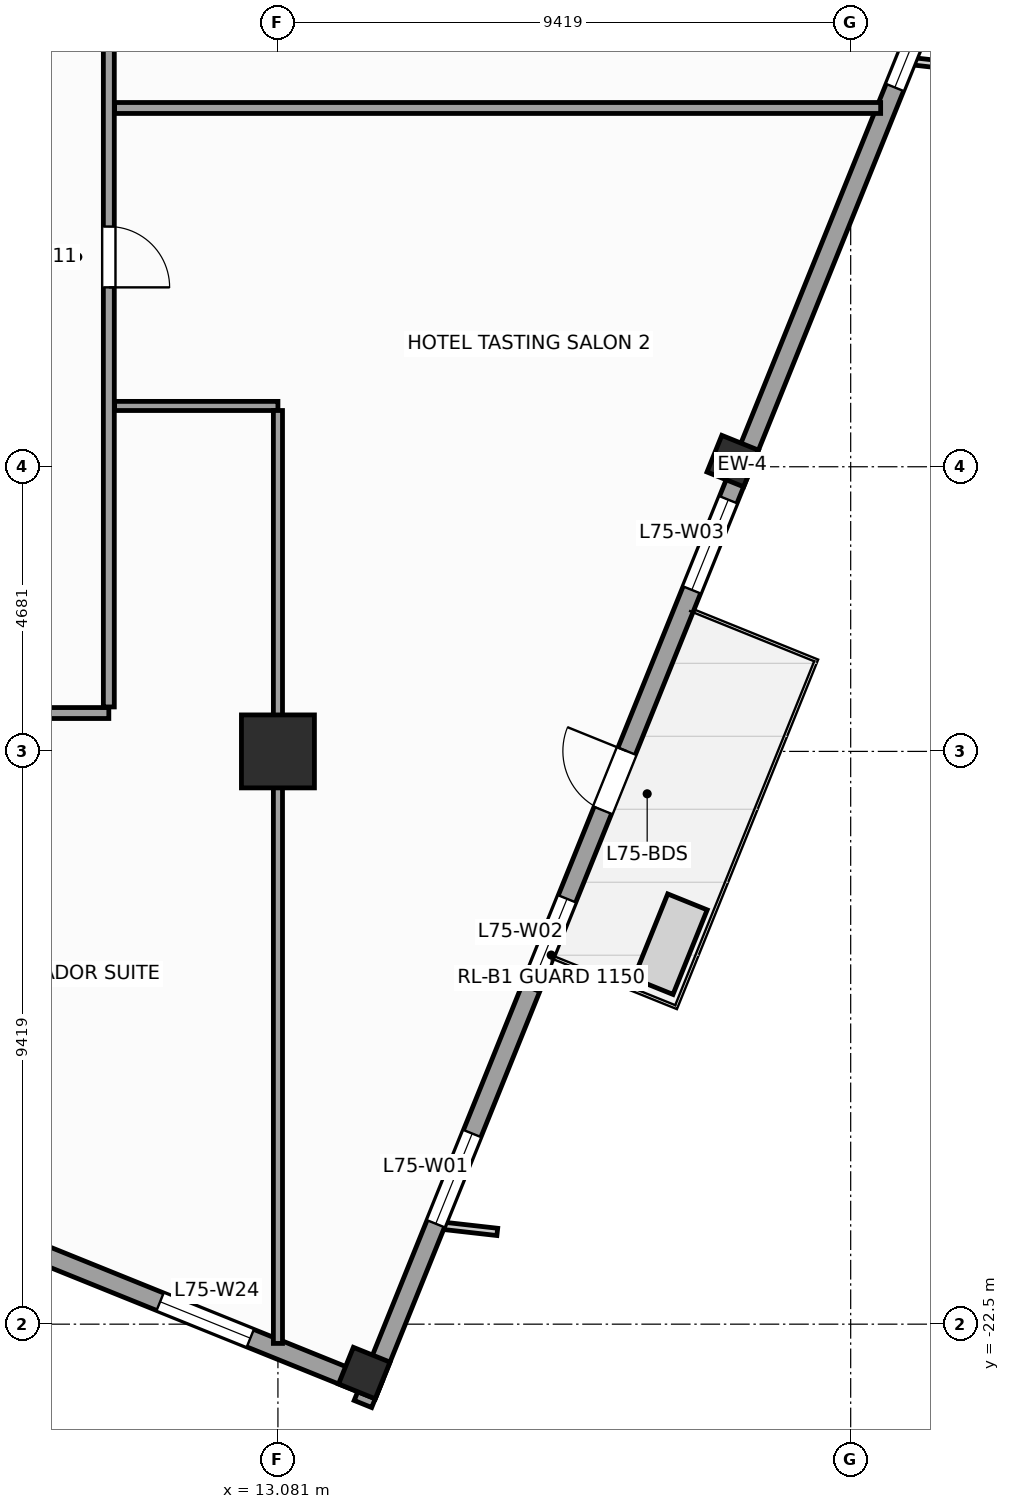
"""IFC4 building model, lengths in metres.
Left out: names, types, materials, properties, quantities, classifications, styles, units other than length and angle.
Written with IfcOpenShell. Run it as: python <this file> out.ifc"""

import sys

from ifc_helpers import new_model, si_unit, direction, frame, frame_2d, origin, origin_2d, place, context, subcontext, project, spatial, rectangle, extrude, source, transform, mapped, element, fill, save


model = new_model("IFC4")
c1 = context("Model", 3, precision=1e-05, world=origin(), true_north=direction((0.0, 1.0)))
c2 = subcontext(c1, "Body", "Model", "MODEL_VIEW")
j1 = project(units=[si_unit("LENGTHUNIT", "METRE"), si_unit("PLANEANGLEUNIT", "RADIAN")], contexts=[c1])
p1 = place(None, origin())
s1 = spatial("IfcSite", under=j1, at=p1, CompositionType="ELEMENT")
p2 = place(p1, origin())
s2 = spatial("IfcBuilding", under=s1, at=p2, CompositionType="ELEMENT")
p3 = place(p2, frame((0.0, 0.0, 304.8)))
s3 = spatial("IfcBuildingStorey", under=s2, at=p3, CompositionType="ELEMENT", Elevation=304.8)
m1 = source(origin(), c2, "Body", "SweptSolid", [
    extrude(rectangle(XDim=1.2, YDim=1.2, at=origin_2d()), origin(), (0.0, 0.0, 1.0), 3.6),
])
p4 = place(p3, frame((13.081, -13.081, 0.0), z_axis=(0.0, 0.0, 1.0), x_axis=(1.0, 0.0, 0.0)))
e1 = element("IfcColumn", 1, at=p4, inside=s3, PredefinedType="COLUMN", context=c2, shape_type="MappedRepresentation", body=[
    mapped(m1, transform((0.0, 0.0, 0.0), scale=1.0)),
])
m2 = source(origin(), c2, "Body", "SweptSolid", [
    extrude(rectangle(XDim=0.65, YDim=0.65, at=origin_2d()), origin(), (0.0, 0.0, 1.0), 3.6),
])
for number, where, z_axis, x_axis in (
    (2, (14.501, -23.304, 0.0), (0.0, 0.0, 1.0), (0.375, 0.927, 0.0)),
    (3, (20.56, -8.307, 0.0), (0.0, 0.0, 1.0), (0.375, 0.927, 0.0)),
):
    element("IfcColumn", number, at=place(p3, frame(where, z_axis=z_axis, x_axis=x_axis)), inside=s3, PredefinedType="COLUMN", context=c2, shape_type="MappedRepresentation", body=[
        mapped(m2, transform((0.0, 0.0, 0.0), scale=1.0)),
    ])
p5 = place(p3, frame((14.479, -23.813, 0.0), z_axis=(0.0, 0.0, 1.0), x_axis=(0.374609557019, 0.927182657188, 0.0)))
e4 = element("IfcWall", 4, at=p5, inside=s3, PredefinedType="STANDARD", context=c2, shape_type="SweptSolid", body=[
    extrude(rectangle(XDim=33.31, YDim=0.31, at=frame_2d((16.655, 0.0))), origin(), (0.0, 0.0, 1.0), 2.75),
])
p6 = place(p5, frame((10.53, 0.0, 0.0)))
e5 = element("IfcOpeningElement", 5, at=p6, cuts=e4, PredefinedType="OPENING", context=c2, shape_type="SweptSolid", body=[
    extrude(rectangle(XDim=1.05, YDim=2.25, at=frame_2d((0.525, 1.125))), frame((0.0, 0.165, 0.0), z_axis=(0.0, -1.0, 0.0), x_axis=(1.0, 0.0, 0.0)), (0.0, 0.0, 1.0), 0.33),
])
p7 = place(p5, frame((3.197, 0.0, 0.47)))
e6 = element("IfcOpeningElement", 6, at=p7, cuts=e4, PredefinedType="OPENING", context=c2, shape_type="SweptSolid", body=[
    extrude(rectangle(XDim=1.6, YDim=2.1, at=frame_2d((0.8, 1.05))), frame((0.0, 0.165, 0.0), z_axis=(0.0, -1.0, 0.0), x_axis=(1.0, 0.0, 0.0)), (0.0, 0.0, 1.0), 0.33),
])
p8 = place(p5, frame((7.36, 0.0, 0.47)))
e7 = element("IfcOpeningElement", 7, at=p8, cuts=e4, PredefinedType="OPENING", context=c2, shape_type="SweptSolid", body=[
    extrude(rectangle(XDim=1.6, YDim=2.1, at=frame_2d((0.8, 1.05))), frame((0.0, 0.165, 0.0), z_axis=(0.0, -1.0, 0.0), x_axis=(1.0, 0.0, 0.0)), (0.0, 0.0, 1.0), 0.33),
])
p9 = place(p5, frame((14.439, 0.0, 0.47)))
e8 = element("IfcOpeningElement", 8, at=p9, cuts=e4, PredefinedType="OPENING", context=c2, shape_type="SweptSolid", body=[
    extrude(rectangle(XDim=1.6, YDim=2.1, at=frame_2d((0.8, 1.05))), frame((0.0, 0.165, 0.0), z_axis=(0.0, -1.0, 0.0), x_axis=(1.0, 0.0, 0.0)), (0.0, 0.0, 1.0), 0.33),
])
p10 = place(p5, frame((23.351, 0.0, 0.47)))
e9 = element("IfcOpeningElement", 9, at=p10, cuts=e4, PredefinedType="OPENING", context=c2, shape_type="SweptSolid", body=[
    extrude(rectangle(XDim=1.6, YDim=2.1, at=frame_2d((0.8, 1.05))), frame((0.0, 0.165, 0.0), z_axis=(0.0, -1.0, 0.0), x_axis=(1.0, 0.0, 0.0)), (0.0, 0.0, 1.0), 0.33),
])
p11 = place(p5, frame((26.347, 0.0, 0.47)))
e10 = element("IfcOpeningElement", 10, at=p11, cuts=e4, PredefinedType="OPENING", context=c2, shape_type="SweptSolid", body=[
    extrude(rectangle(XDim=1.6, YDim=2.1, at=frame_2d((0.8, 1.05))), frame((0.0, 0.165, 0.0), z_axis=(0.0, -1.0, 0.0), x_axis=(1.0, 0.0, 0.0)), (0.0, 0.0, 1.0), 0.33),
])
p12 = place(p3, frame((9.032, -21.278, 0.0), z_axis=(0.0, 0.0, 1.0), x_axis=(0.927185411764, -0.374602739196, 0.0)))
e11 = element("IfcWall", 11, at=p12, inside=s3, PredefinedType="STANDARD", context=c2, shape_type="SweptSolid", body=[
    extrude(rectangle(XDim=6.155, YDim=0.31, at=frame_2d((3.078, 0.0))), origin(), (0.0, 0.0, 1.0), 3.35),
])
p13 = place(p12, frame((2.278, 0.0, 0.47)))
e12 = element("IfcOpeningElement", 12, at=p13, cuts=e11, PredefinedType="OPENING", context=c2, shape_type="SweptSolid", body=[
    extrude(rectangle(XDim=1.6, YDim=2.1, at=frame_2d((0.8, 1.05))), frame((0.0, 0.165, 0.0), z_axis=(0.0, -1.0, 0.0), x_axis=(1.0, 0.0, 0.0)), (0.0, 0.0, 1.0), 0.33),
])
p14 = place(p3, frame((-10.3, -12.45, 0.0), z_axis=(0.0, 0.0, 1.0), x_axis=(1.0, 0.0, 0.0)))
e13 = element("IfcWall", 13, at=p14, inside=s3, PredefinedType="PARTITIONING", context=c2, shape_type="SweptSolid", body=[
    extrude(rectangle(XDim=20.6, YDim=0.18, at=frame_2d((10.3, 0.0))), origin(), (0.0, 0.0, 1.0), 3.35),
])
p15 = place(p14, frame((1.605, 0.0, 0.0)))
e14 = element("IfcOpeningElement", 14, at=p15, cuts=e13, PredefinedType="OPENING", context=c2, shape_type="SweptSolid", body=[
    extrude(rectangle(XDim=0.95, YDim=2.1, at=frame_2d((0.475, 1.05))), frame((0.0, 0.1, 0.0), z_axis=(0.0, -1.0, 0.0), x_axis=(1.0, 0.0, 0.0)), (0.0, 0.0, 1.0), 0.2),
])
p16 = place(p14, frame((16.036, 0.0, 0.0)))
e15 = element("IfcOpeningElement", 15, at=p16, cuts=e13, PredefinedType="OPENING", context=c2, shape_type="SweptSolid", body=[
    extrude(rectangle(XDim=1.0, YDim=2.15, at=frame_2d((0.5, 1.075))), frame((0.0, 0.1, 0.0), z_axis=(0.0, -1.0, 0.0), x_axis=(1.0, 0.0, 0.0)), (0.0, 0.0, 1.0), 0.2),
])
p17 = place(p14, frame((9.55, 0.0, 0.0)))
e16 = element("IfcOpeningElement", 16, at=p17, cuts=e13, PredefinedType="OPENING", context=c2, shape_type="SweptSolid", body=[
    extrude(rectangle(XDim=1.0, YDim=2.15, at=frame_2d((0.5, 1.075))), frame((0.0, 0.1, 0.0), z_axis=(0.0, -1.0, 0.0), x_axis=(1.0, 0.0, 0.0)), (0.0, 0.0, 1.0), 0.2),
])
p18 = place(p3, frame((10.3, -12.35, 0.0), z_axis=(0.0, 0.0, 1.0), x_axis=(0.0, 1.0, 0.0)))
e17 = element("IfcWall", 17, at=p18, inside=s3, PredefinedType="PARTITIONING", context=c2, shape_type="SweptSolid", body=[
    extrude(rectangle(XDim=24.7, YDim=0.18, at=frame_2d((12.35, 0.0))), origin(), (0.0, 0.0, 1.0), 3.35),
])
p19 = place(p18, frame((21.561, 0.0, 0.0)))
e18 = element("IfcOpeningElement", 18, at=p19, cuts=e17, PredefinedType="OPENING", context=c2, shape_type="SweptSolid", body=[
    extrude(rectangle(XDim=1.0, YDim=2.15, at=frame_2d((0.5, 1.075))), frame((0.0, 0.1, 0.0), z_axis=(0.0, -1.0, 0.0), x_axis=(1.0, 0.0, 0.0)), (0.0, 0.0, 1.0), 0.2),
])
p20 = place(p18, frame((16.8, 0.0, 0.0)))
e19 = element("IfcOpeningElement", 19, at=p20, cuts=e17, PredefinedType="OPENING", context=c2, shape_type="SweptSolid", body=[
    extrude(rectangle(XDim=1.0, YDim=2.15, at=frame_2d((0.5, 1.075))), frame((0.0, 0.1, 0.0), z_axis=(0.0, -1.0, 0.0), x_axis=(1.0, 0.0, 0.0)), (0.0, 0.0, 1.0), 0.2),
])
p21 = place(p18, frame((11.85, 0.0, 0.0)))
e20 = element("IfcOpeningElement", 20, at=p21, cuts=e17, PredefinedType="OPENING", context=c2, shape_type="SweptSolid", body=[
    extrude(rectangle(XDim=1.0, YDim=2.15, at=frame_2d((0.5, 1.075))), frame((0.0, 0.1, 0.0), z_axis=(0.0, -1.0, 0.0), x_axis=(1.0, 0.0, 0.0)), (0.0, 0.0, 1.0), 0.2),
])
p22 = place(p18, frame((6.9, 0.0, 0.0)))
e21 = element("IfcOpeningElement", 21, at=p22, cuts=e17, PredefinedType="OPENING", context=c2, shape_type="SweptSolid", body=[
    extrude(rectangle(XDim=1.0, YDim=2.15, at=frame_2d((0.5, 1.075))), frame((0.0, 0.1, 0.0), z_axis=(0.0, -1.0, 0.0), x_axis=(1.0, 0.0, 0.0)), (0.0, 0.0, 1.0), 0.2),
])
p23 = place(p3, frame((10.395, -2.5, 0.0), z_axis=(0.0, 0.0, 1.0), x_axis=(1.0, 0.0, 0.0)))
e22 = element("IfcWall", 22, at=p23, inside=s3, PredefinedType="PARTITIONING", context=c2, shape_type="SweptSolid", body=[
    extrude(rectangle(XDim=12.598, YDim=0.18, at=frame_2d((6.299, 0.0))), origin(), (0.0, 0.0, 1.0), 3.35),
])
p24 = place(p3, frame((10.395, -7.4, 0.0), z_axis=(0.0, 0.0, 1.0), x_axis=(1.0, 0.0, 0.0)))
e23 = element("IfcWall", 23, at=p24, inside=s3, PredefinedType="PARTITIONING", context=c2, shape_type="SweptSolid", body=[
    extrude(rectangle(XDim=2.686, YDim=0.15, at=frame_2d((1.343, 0.0))), origin(), (0.0, 0.0, 1.0), 3.35),
])
p25 = place(p3, frame((13.081, -7.475, 0.0), z_axis=(0.0, 0.0, 1.0), x_axis=(0.0, -1.0, 0.0)))
e24 = element("IfcWall", 24, at=p25, inside=s3, PredefinedType="PARTITIONING", context=c2, shape_type="SweptSolid", body=[
    extrude(rectangle(XDim=15.342, YDim=0.15, at=frame_2d((7.671, 0.0))), origin(), (0.0, 0.0, 1.0), 2.45),
])
m3 = source(origin(), c2, "Body", "SweptSolid", [
    extrude(rectangle(XDim=1.05, YDim=2.25, at=frame_2d((0.525, 1.125))), frame((0.0, 0.025, 0.0), z_axis=(0.0, -1.0, 0.0), x_axis=(1.0, 0.0, 0.0)), (0.0, 0.0, 1.0), 0.05),
])
p26 = place(p6, origin())
e25 = element("IfcDoor", 25, at=p26, inside=s3, OperationType="SINGLE_SWING_RIGHT", PredefinedType="DOOR", context=c2, shape_type="MappedRepresentation", body=[
    mapped(m3, transform((0.0, 0.0, 0.0), scale=1.0)),
])
fill(e5, e25)
m4 = source(origin(), c2, "Body", "SweptSolid", [
    extrude(rectangle(XDim=1.6, YDim=2.1, at=frame_2d((0.8, 1.05))), frame((0.0, 0.03, 0.0), z_axis=(0.0, -1.0, 0.0), x_axis=(1.0, 0.0, 0.0)), (0.0, 0.0, 1.0), 0.06),
])
p27 = place(p7, origin())
e26 = element("IfcWindow", 26, at=p27, inside=s3, PartitioningType="SINGLE_PANEL", PredefinedType="WINDOW", context=c2, shape_type="MappedRepresentation", body=[
    mapped(m4, transform((0.0, 0.0, 0.0), scale=1.0)),
])
fill(e6, e26)
p28 = place(p8, origin())
e27 = element("IfcWindow", 27, at=p28, inside=s3, PartitioningType="SINGLE_PANEL", PredefinedType="WINDOW", context=c2, shape_type="MappedRepresentation", body=[
    mapped(m4, transform((0.0, 0.0, 0.0), scale=1.0)),
])
fill(e7, e27)
p29 = place(p9, origin())
e28 = element("IfcWindow", 28, at=p29, inside=s3, PartitioningType="SINGLE_PANEL", PredefinedType="WINDOW", context=c2, shape_type="MappedRepresentation", body=[
    mapped(m4, transform((0.0, 0.0, 0.0), scale=1.0)),
])
fill(e8, e28)
p30 = place(p10, origin())
e29 = element("IfcWindow", 29, at=p30, inside=s3, PartitioningType="SINGLE_PANEL", PredefinedType="WINDOW", context=c2, shape_type="MappedRepresentation", body=[
    mapped(m4, transform((0.0, 0.0, 0.0), scale=1.0)),
])
fill(e9, e29)
p31 = place(p13, origin())
e30 = element("IfcWindow", 30, at=p31, inside=s3, PartitioningType="SINGLE_PANEL", PredefinedType="WINDOW", context=c2, shape_type="MappedRepresentation", body=[
    mapped(m4, transform((0.0, 0.0, 0.0), scale=1.0)),
])
fill(e12, e30)
m5 = source(origin(), c2, "Body", "SweptSolid", [
    extrude(rectangle(XDim=1.0, YDim=2.15, at=frame_2d((0.5, 1.075))), frame((0.0, 0.025, 0.0), z_axis=(0.0, -1.0, 0.0), x_axis=(1.0, 0.0, 0.0)), (0.0, 0.0, 1.0), 0.05),
])
p32 = place(p22, frame((1.0, 0.0, 0.0), z_axis=(0.0, 0.0, 1.0), x_axis=(-1.0, 0.0, 0.0)))
e31 = element("IfcDoor", 31, at=p32, inside=s3, OperationType="SINGLE_SWING_LEFT", PredefinedType="DOOR", context=c2, shape_type="MappedRepresentation", body=[
    mapped(m5, transform((0.0, 0.0, 0.0), scale=1.0)),
])
fill(e21, e31)
save(model, sys.argv[1])
